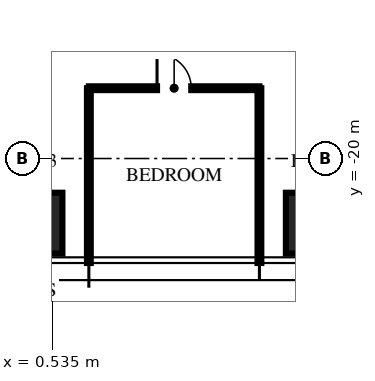
"""IFC4 building model, lengths in metres.
Left out: names, types, materials, properties, quantities, classifications, styles, units other than length and angle.
Written with IfcOpenShell. Run it as: python <this file> out.ifc"""

import sys

from ifc_helpers import new_model, si_unit, direction, frame, frame_2d, origin, origin_2d, place, context, subcontext, project, spatial, rectangle, extrude, element, fill, save


model = new_model("IFC4")
c1 = context("Model", 3, precision=1e-05, world=origin(), true_north=direction((0.0, 1.0)))
c2 = subcontext(c1, "Body", "Model", "MODEL_VIEW")
j1 = project(units=[si_unit("LENGTHUNIT", "METRE"), si_unit("PLANEANGLEUNIT", "RADIAN")], contexts=[c1])
p1 = place(None, origin())
s1 = spatial("IfcSite", under=j1, at=p1, CompositionType="ELEMENT")
p2 = place(p1, origin())
s2 = spatial("IfcBuilding", under=s1, at=p2, CompositionType="ELEMENT")
p3 = place(p2, frame((0.0, 0.0, 345.75)))
s3 = spatial("IfcBuildingStorey", under=s2, at=p3, CompositionType="ELEMENT", Elevation=345.75)
for number, where, z_axis, x_axis in (
    (1, (7.48, -21.7, 0.0), (0.0, 0.0, 1.0), (1.0, 0.0, 0.0)),
    (2, (0.0, -21.7, 0.0), (0.0, 0.0, 1.0), (1.0, 0.0, 0.0)),
):
    element("IfcColumn", number, at=place(p3, frame(where, z_axis=z_axis, x_axis=x_axis)), inside=s3, PredefinedType="COLUMN", context=c2, shape_type="SweptSolid", body=[
        extrude(rectangle(XDim=1.6, YDim=1.6, at=origin_2d()), origin(), (0.0, 0.0, 1.0), 3.75),
    ])
for number, where, z_axis, x_axis in (
    (3, (1.496, -18.15, 0.0), (0.0, 0.0, 1.0), (0.0, -1.0, 0.0)),
    (4, (5.984, -18.15, 0.0), (0.0, 0.0, 1.0), (0.0, -1.0, 0.0)),
):
    element("IfcWall", number, at=place(p3, frame(where, z_axis=z_axis, x_axis=x_axis)), inside=s3, PredefinedType="PARTITIONING", context=c2, shape_type="SweptSolid", body=[
        extrude(rectangle(XDim=4.6, YDim=0.1, at=frame_2d((2.3, 0.0))), origin(), (0.0, 0.0, 1.0), 2.91),
    ])
p4 = place(p3, frame((1.496, -18.15, 0.0), z_axis=(0.0, 0.0, 1.0), x_axis=(1.0, 0.0, 0.0)))
e5 = element("IfcWall", 5, at=p4, inside=s3, PredefinedType="PARTITIONING", context=c2, shape_type="SweptSolid", body=[
    extrude(rectangle(XDim=4.488, YDim=0.1, at=frame_2d((2.244, 0.0))), origin(), (0.0, 0.0, 1.0), 2.81),
])
p5 = place(p4, frame((1.794, 0.0, 0.0)))
e6 = element("IfcOpeningElement", 6, at=p5, cuts=e5, PredefinedType="OPENING", context=c2, shape_type="SweptSolid", body=[
    extrude(rectangle(XDim=0.9, YDim=2.1, at=frame_2d((0.45, 1.05))), frame((0.0, 0.06, 0.0), z_axis=(0.0, -1.0, 0.0), x_axis=(1.0, 0.0, 0.0)), (0.0, 0.0, 1.0), 0.12),
])
p6 = place(p5, origin())
e7 = element("IfcDoor", 7, at=p6, inside=s3, OperationType="SINGLE_SWING_LEFT", PredefinedType="DOOR", context=c2, shape_type="SweptSolid", body=[
    extrude(rectangle(XDim=0.9, YDim=2.1, at=frame_2d((0.45, 1.05))), frame((0.0, 0.025, 0.0), z_axis=(0.0, -1.0, 0.0), x_axis=(1.0, 0.0, 0.0)), (0.0, 0.0, 1.0), 0.05),
])
fill(e6, e7)
save(model, sys.argv[1])
